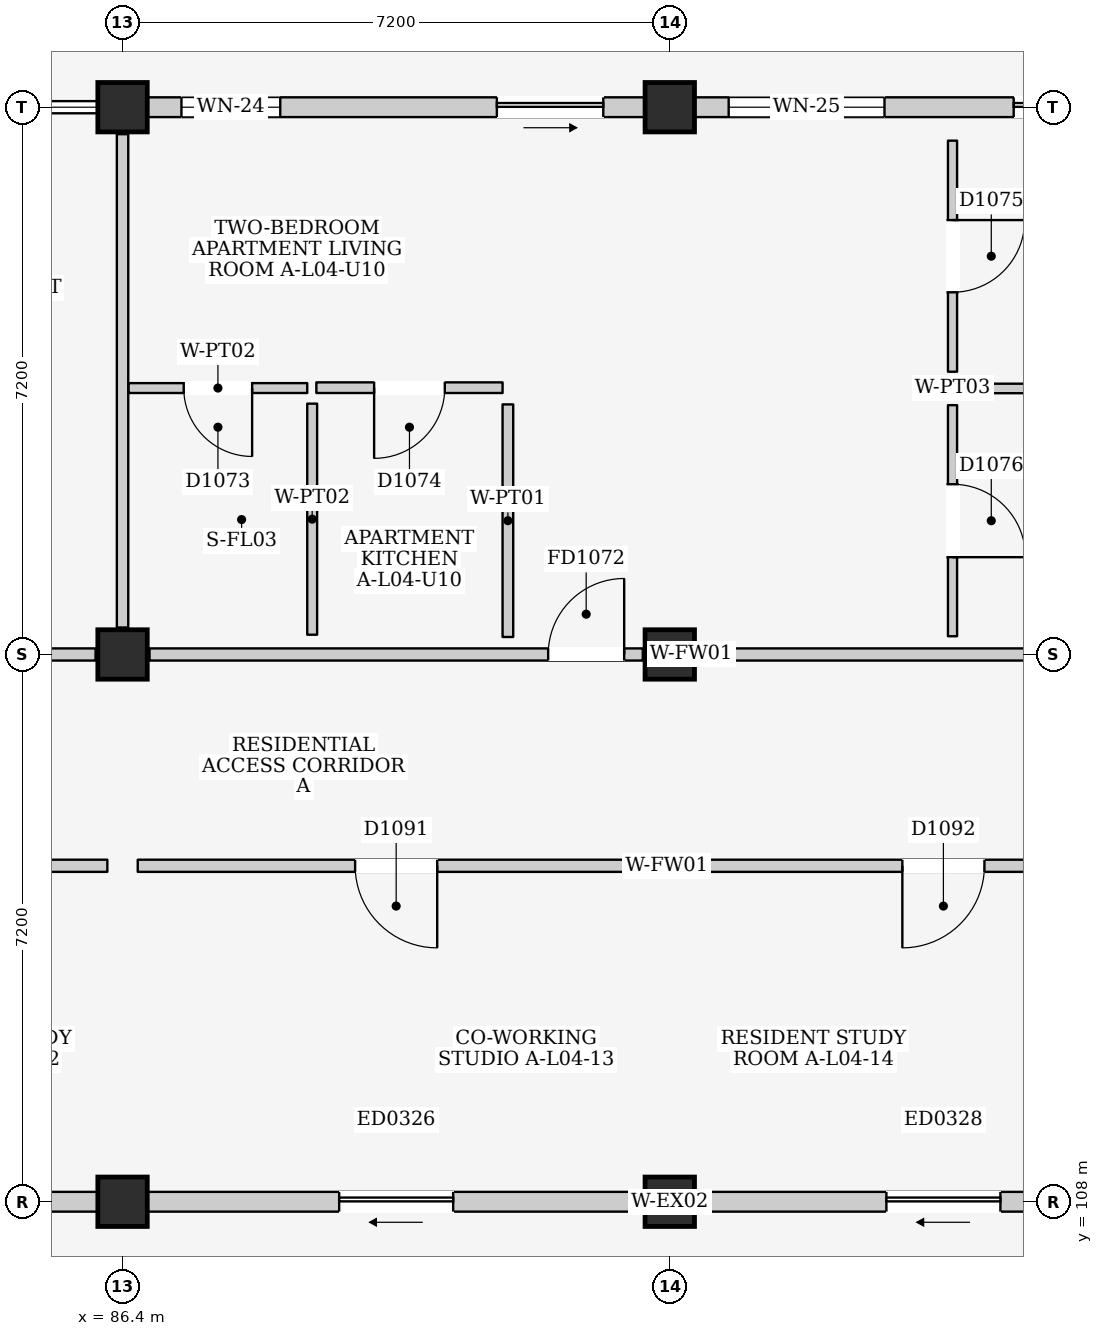
"""IFC4 building model, lengths in metres.
Left out: names, types, materials, properties, quantities, classifications, styles, units other than length and angle.
Written with IfcOpenShell. Run it as: python <this file> out.ifc"""

import sys

from ifc_helpers import new_model, si_unit, direction, frame, frame_2d, origin, origin_2d, place, context, subcontext, project, spatial, rectangle, extrude, element, fill, save


model = new_model("IFC4")
c1 = context("Model", 3, precision=1e-05, world=origin(), true_north=direction((0.0, 1.0)))
c2 = subcontext(c1, "Body", "Model", "MODEL_VIEW")
j1 = project(units=[si_unit("LENGTHUNIT", "METRE"), si_unit("PLANEANGLEUNIT", "RADIAN")], contexts=[c1])
p1 = place(None, origin())
s1 = spatial("IfcSite", under=j1, at=p1, CompositionType="ELEMENT")
p2 = place(p1, origin())
s2 = spatial("IfcBuilding", under=s1, at=p2, CompositionType="ELEMENT")
p3 = place(p2, frame((0.0, 0.0, 15.4)))
s3 = spatial("IfcBuildingStorey", under=s2, at=p3, CompositionType="ELEMENT", Elevation=15.4)
for number, where, z_axis, x_axis in (
    (1, (86.4, 108.0, 0.0), (0.0, 0.0, 1.0), (1.0, 0.0, 0.0)),
    (2, (86.4, 115.2, 0.0), (0.0, 0.0, 1.0), (1.0, 0.0, 0.0)),
    (3, (86.4, 122.4, 0.0), (0.0, 0.0, 1.0), (1.0, 0.0, 0.0)),
    (4, (93.6, 108.0, 0.0), (0.0, 0.0, 1.0), (1.0, 0.0, 0.0)),
    (5, (93.6, 115.2, 0.0), (0.0, 0.0, 1.0), (1.0, 0.0, 0.0)),
    (6, (93.6, 122.4, 0.0), (0.0, 0.0, 1.0), (1.0, 0.0, 0.0)),
):
    element("IfcColumn", number, at=place(p3, frame(where, z_axis=z_axis, x_axis=x_axis)), inside=s3, PredefinedType="COLUMN", context=c2, shape_type="SweptSolid", body=[
        extrude(rectangle(XDim=0.65, YDim=0.65, at=origin_2d()), origin(), (0.0, 0.0, 1.0), 3.2),
    ])
p4 = place(p3, frame((79.525, 108.0, 0.0), z_axis=(0.0, 0.0, 1.0), x_axis=(1.0, 0.0, 0.0)))
e7 = element("IfcWall", 7, at=p4, inside=s3, PredefinedType="ELEMENTEDWALL", context=c2, shape_type="SweptSolid", body=[
    extrude(rectangle(XDim=6.55, YDim=0.26, at=frame_2d((3.275, 0.0))), origin(), (0.0, 0.0, 1.0), 2.285),
])
p5 = place(p4, frame((2.525, 0.0, 0.0)))
e8 = element("IfcOpeningElement", 8, at=p5, cuts=e7, PredefinedType="OPENING", context=c2, shape_type="SweptSolid", body=[
    extrude(rectangle(XDim=1.5, YDim=2.12, at=frame_2d((0.75, 1.06))), frame((0.0, 0.145, 0.0), z_axis=(0.0, -1.0, 0.0), x_axis=(1.0, 0.0, 0.0)), (0.0, 0.0, 1.0), 0.29),
])
p6 = place(p3, frame((86.725, 122.4, 0.0), z_axis=(0.0, 0.0, 1.0), x_axis=(1.0, 0.0, 0.0)))
e9 = element("IfcWall", 9, at=p6, inside=s3, PredefinedType="ELEMENTEDWALL", context=c2, shape_type="SweptSolid", body=[
    extrude(rectangle(XDim=6.55, YDim=0.26, at=frame_2d((3.275, 0.0))), origin(), (0.0, 0.0, 1.0), 2.43),
])
p7 = place(p6, frame((4.6, 0.0, 0.0)))
e10 = element("IfcOpeningElement", 10, at=p7, cuts=e9, PredefinedType="OPENING", context=c2, shape_type="SweptSolid", body=[
    extrude(rectangle(XDim=1.4, YDim=2.1, at=frame_2d((0.7, 1.05))), frame((0.0, 0.145, 0.0), z_axis=(0.0, -1.0, 0.0), x_axis=(1.0, 0.0, 0.0)), (0.0, 0.0, 1.0), 0.29),
])
p8 = place(p6, frame((0.45, 0.0, 0.9)))
e11 = element("IfcOpeningElement", 11, at=p8, cuts=e9, PredefinedType="OPENING", context=c2, shape_type="SweptSolid", body=[
    extrude(rectangle(XDim=1.3, YDim=1.25, at=frame_2d((0.65, 0.625))), frame((0.0, 0.145, 0.0), z_axis=(0.0, -1.0, 0.0), x_axis=(1.0, 0.0, 0.0)), (0.0, 0.0, 1.0), 0.29),
])
p9 = place(p3, frame((86.725, 108.0, 0.0), z_axis=(0.0, 0.0, 1.0), x_axis=(1.0, 0.0, 0.0)))
e12 = element("IfcWall", 12, at=p9, inside=s3, PredefinedType="ELEMENTEDWALL", context=c2, shape_type="SweptSolid", body=[
    extrude(rectangle(XDim=6.55, YDim=0.26, at=frame_2d((3.275, 0.0))), origin(), (0.0, 0.0, 1.0), 2.285),
])
p10 = place(p9, frame((2.525, 0.0, 0.0)))
e13 = element("IfcOpeningElement", 13, at=p10, cuts=e12, PredefinedType="OPENING", context=c2, shape_type="SweptSolid", body=[
    extrude(rectangle(XDim=1.5, YDim=2.12, at=frame_2d((0.75, 1.06))), frame((0.0, 0.145, 0.0), z_axis=(0.0, -1.0, 0.0), x_axis=(1.0, 0.0, 0.0)), (0.0, 0.0, 1.0), 0.29),
])
p11 = place(p3, frame((93.925, 122.4, 0.0), z_axis=(0.0, 0.0, 1.0), x_axis=(1.0, 0.0, 0.0)))
e14 = element("IfcWall", 14, at=p11, inside=s3, PredefinedType="ELEMENTEDWALL", context=c2, shape_type="SweptSolid", body=[
    extrude(rectangle(XDim=6.55, YDim=0.26, at=frame_2d((3.275, 0.0))), origin(), (0.0, 0.0, 1.0), 2.43),
])
p12 = place(p11, frame((4.2, 0.0, 0.0)))
e15 = element("IfcOpeningElement", 15, at=p12, cuts=e14, PredefinedType="OPENING", context=c2, shape_type="SweptSolid", body=[
    extrude(rectangle(XDim=1.8, YDim=2.12, at=frame_2d((0.9, 1.06))), frame((0.0, 0.145, 0.0), z_axis=(0.0, -1.0, 0.0), x_axis=(1.0, 0.0, 0.0)), (0.0, 0.0, 1.0), 0.29),
])
p13 = place(p11, frame((0.45, 0.0, 0.71)))
e16 = element("IfcOpeningElement", 16, at=p13, cuts=e14, PredefinedType="OPENING", context=c2, shape_type="SweptSolid", body=[
    extrude(rectangle(XDim=2.05, YDim=1.6, at=frame_2d((1.025, 0.8))), frame((0.0, 0.145, 0.0), z_axis=(0.0, -1.0, 0.0), x_axis=(1.0, 0.0, 0.0)), (0.0, 0.0, 1.0), 0.29),
])
p14 = place(p3, frame((93.925, 108.0, 0.0), z_axis=(0.0, 0.0, 1.0), x_axis=(1.0, 0.0, 0.0)))
e17 = element("IfcWall", 17, at=p14, inside=s3, PredefinedType="ELEMENTEDWALL", context=c2, shape_type="SweptSolid", body=[
    extrude(rectangle(XDim=6.55, YDim=0.26, at=frame_2d((3.275, 0.0))), origin(), (0.0, 0.0, 1.0), 2.285),
])
p15 = place(p14, frame((2.525, 0.0, 0.0)))
e18 = element("IfcOpeningElement", 18, at=p15, cuts=e17, PredefinedType="OPENING", context=c2, shape_type="SweptSolid", body=[
    extrude(rectangle(XDim=1.5, YDim=2.12, at=frame_2d((0.75, 1.06))), frame((0.0, 0.145, 0.0), z_axis=(0.0, -1.0, 0.0), x_axis=(1.0, 0.0, 0.0)), (0.0, 0.0, 1.0), 0.29),
])
p16 = place(p3, frame((79.555, 115.2, 0.0), z_axis=(0.0, 0.0, 1.0), x_axis=(1.0, 0.0, 0.0)))
e19 = element("IfcWall", 19, at=p16, inside=s3, PredefinedType="PARTITIONING", context=c2, shape_type="SweptSolid", body=[
    extrude(rectangle(XDim=6.49, YDim=0.16, at=frame_2d((3.245, 0.0))), origin(), (0.0, 0.0, 1.0), 2.285),
])
p17 = place(p16, frame((2.745, 0.0, 0.0)))
e20 = element("IfcOpeningElement", 20, at=p17, cuts=e19, PredefinedType="OPENING", context=c2, shape_type="SweptSolid", body=[
    extrude(rectangle(XDim=1.0, YDim=2.15, at=frame_2d((0.5, 1.075))), frame((0.0, 0.095, 0.0), z_axis=(0.0, -1.0, 0.0), x_axis=(1.0, 0.0, 0.0)), (0.0, 0.0, 1.0), 0.19),
])
p18 = place(p3, frame((86.4, 115.555, 0.0), z_axis=(0.0, 0.0, 1.0), x_axis=(0.0, 1.0, 0.0)))
e21 = element("IfcWall", 21, at=p18, inside=s3, PredefinedType="PARTITIONING", context=c2, shape_type="SweptSolid", body=[
    extrude(rectangle(XDim=6.49, YDim=0.15, at=frame_2d((3.245, 0.0))), origin(), (0.0, 0.0, 1.0), 2.385),
])
p19 = place(p3, frame((86.755, 115.2, 0.0), z_axis=(0.0, 0.0, 1.0), x_axis=(1.0, 0.0, 0.0)))
e22 = element("IfcWall", 22, at=p19, inside=s3, PredefinedType="PARTITIONING", context=c2, shape_type="SweptSolid", body=[
    extrude(rectangle(XDim=6.49, YDim=0.16, at=frame_2d((3.245, 0.0))), origin(), (0.0, 0.0, 1.0), 2.285),
])
p20 = place(p19, frame((5.245, 0.0, 0.0)))
e23 = element("IfcOpeningElement", 23, at=p20, cuts=e22, PredefinedType="OPENING", context=c2, shape_type="SweptSolid", body=[
    extrude(rectangle(XDim=1.0, YDim=2.15, at=frame_2d((0.5, 1.075))), frame((0.0, 0.095, 0.0), z_axis=(0.0, -1.0, 0.0), x_axis=(1.0, 0.0, 0.0)), (0.0, 0.0, 1.0), 0.19),
])
p21 = place(p3, frame((93.955, 115.2, 0.0), z_axis=(0.0, 0.0, 1.0), x_axis=(1.0, 0.0, 0.0)))
e24 = element("IfcWall", 24, at=p21, inside=s3, PredefinedType="PARTITIONING", context=c2, shape_type="SweptSolid", body=[
    extrude(rectangle(XDim=6.49, YDim=0.16, at=frame_2d((3.245, 0.0))), origin(), (0.0, 0.0, 1.0), 2.285),
])
p22 = place(p3, frame((86.48, 118.705, 0.0), z_axis=(0.0, 0.0, 1.0), x_axis=(1.0, 0.0, 0.0)))
e25 = element("IfcWall", 25, at=p22, inside=s3, PredefinedType="PARTITIONING", context=c2, shape_type="SweptSolid", body=[
    extrude(rectangle(XDim=2.35, YDim=0.13, at=frame_2d((1.175, 0.0))), origin(), (0.0, 0.0, 1.0), 2.95),
])
p23 = place(p22, frame((0.725, 0.0, 0.0)))
e26 = element("IfcOpeningElement", 26, at=p23, cuts=e25, PredefinedType="OPENING", context=c2, shape_type="SweptSolid", body=[
    extrude(rectangle(XDim=0.9, YDim=2.1, at=frame_2d((0.45, 1.05))), frame((0.0, 0.08, 0.0), z_axis=(0.0, -1.0, 0.0), x_axis=(1.0, 0.0, 0.0)), (0.0, 0.0, 1.0), 0.16),
])
p24 = place(p3, frame((88.895, 115.46, 0.0), z_axis=(0.0, 0.0, 1.0), x_axis=(0.0, 1.0, 0.0)))
e27 = element("IfcWall", 27, at=p24, inside=s3, PredefinedType="PARTITIONING", context=c2, shape_type="SweptSolid", body=[
    extrude(rectangle(XDim=3.04, YDim=0.13, at=frame_2d((1.52, 0.0))), origin(), (0.0, 0.0, 1.0), 2.95),
])
p25 = place(p3, frame((88.95, 118.71, 0.0), z_axis=(0.0, 0.0, 1.0), x_axis=(1.0, 0.0, 0.0)))
e28 = element("IfcWall", 28, at=p25, inside=s3, PredefinedType="PARTITIONING", context=c2, shape_type="SweptSolid", body=[
    extrude(rectangle(XDim=2.45, YDim=0.14, at=frame_2d((1.225, 0.0))), origin(), (0.0, 0.0, 1.0), 2.95),
])
p26 = place(p25, frame((0.76, 0.0, 0.0)))
e29 = element("IfcOpeningElement", 29, at=p26, cuts=e28, PredefinedType="OPENING", context=c2, shape_type="SweptSolid", body=[
    extrude(rectangle(XDim=0.93, YDim=2.14, at=frame_2d((0.465, 1.07))), frame((0.0, 0.085, 0.0), z_axis=(0.0, -1.0, 0.0), x_axis=(1.0, 0.0, 0.0)), (0.0, 0.0, 1.0), 0.17),
])
p27 = place(p3, frame((91.47, 115.43, 0.0), z_axis=(0.0, 0.0, 1.0), x_axis=(0.0, 1.0, 0.0)))
e30 = element("IfcWall", 30, at=p27, inside=s3, PredefinedType="PARTITIONING", context=c2, shape_type="SweptSolid", body=[
    extrude(rectangle(XDim=3.06, YDim=0.14, at=frame_2d((1.53, 0.0))), origin(), (0.0, 0.0, 1.0), 2.95),
])
p28 = place(p3, frame((97.32, 118.92, 0.0), z_axis=(0.0, 0.0, 1.0), x_axis=(0.0, 1.0, 0.0)))
e31 = element("IfcWall", 31, at=p28, inside=s3, PredefinedType="PARTITIONING", context=c2, shape_type="SweptSolid", body=[
    extrude(rectangle(XDim=3.04, YDim=0.12, at=frame_2d((1.52, 0.0))), origin(), (0.0, 0.0, 1.0), 2.95),
])
p29 = place(p28, frame((1.045, 0.0, 0.0)))
e32 = element("IfcOpeningElement", 32, at=p29, cuts=e31, PredefinedType="OPENING", context=c2, shape_type="SweptSolid", body=[
    extrude(rectangle(XDim=0.95, YDim=2.15, at=frame_2d((0.475, 1.075))), frame((0.0, 0.075, 0.0), z_axis=(0.0, -1.0, 0.0), x_axis=(1.0, 0.0, 0.0)), (0.0, 0.0, 1.0), 0.15),
])
p30 = place(p3, frame((97.52, 118.7, 0.0), z_axis=(0.0, 0.0, 1.0), x_axis=(1.0, 0.0, 0.0)))
e33 = element("IfcWall", 33, at=p30, inside=s3, PredefinedType="PARTITIONING", context=c2, shape_type="SweptSolid", body=[
    extrude(rectangle(XDim=3.06, YDim=0.125, at=frame_2d((1.53, 0.0))), origin(), (0.0, 0.0, 1.0), 2.95),
])
p31 = place(p3, frame((97.32, 115.44, 0.0), z_axis=(0.0, 0.0, 1.0), x_axis=(0.0, 1.0, 0.0)))
e34 = element("IfcWall", 34, at=p31, inside=s3, PredefinedType="PARTITIONING", context=c2, shape_type="SweptSolid", body=[
    extrude(rectangle(XDim=3.04, YDim=0.12, at=frame_2d((1.52, 0.0))), origin(), (0.0, 0.0, 1.0), 2.95),
])
p32 = place(p31, frame((1.04, 0.0, 0.0)))
e35 = element("IfcOpeningElement", 35, at=p32, cuts=e34, PredefinedType="OPENING", context=c2, shape_type="SweptSolid", body=[
    extrude(rectangle(XDim=0.96, YDim=2.15, at=frame_2d((0.48, 1.075))), frame((0.0, 0.075, 0.0), z_axis=(0.0, -1.0, 0.0), x_axis=(1.0, 0.0, 0.0)), (0.0, 0.0, 1.0), 0.15),
])
p33 = place(p3, frame((79.4, 112.42, 0.0), z_axis=(0.0, 0.0, 1.0), x_axis=(1.0, 0.0, 0.0)))
e36 = element("IfcWall", 36, at=p33, inside=s3, PredefinedType="PARTITIONING", context=c2, shape_type="SweptSolid", body=[
    extrude(rectangle(XDim=6.8, YDim=0.16, at=frame_2d((3.4, 0.0))), origin(), (0.0, 0.0, 1.0), 2.95),
])
p34 = place(p33, frame((2.86, 0.0, 0.0)))
e37 = element("IfcOpeningElement", 37, at=p34, cuts=e36, PredefinedType="OPENING", context=c2, shape_type="SweptSolid", body=[
    extrude(rectangle(XDim=1.08, YDim=2.22, at=frame_2d((0.54, 1.11))), frame((0.0, 0.095, 0.0), z_axis=(0.0, -1.0, 0.0), x_axis=(1.0, 0.0, 0.0)), (0.0, 0.0, 1.0), 0.19),
])
p35 = place(p3, frame((86.6, 112.42, 0.0), z_axis=(0.0, 0.0, 1.0), x_axis=(1.0, 0.0, 0.0)))
e38 = element("IfcWall", 38, at=p35, inside=s3, PredefinedType="PARTITIONING", context=c2, shape_type="SweptSolid", body=[
    extrude(rectangle(XDim=6.8, YDim=0.16, at=frame_2d((3.4, 0.0))), origin(), (0.0, 0.0, 1.0), 2.95),
])
p36 = place(p35, frame((2.86, 0.0, 0.0)))
e39 = element("IfcOpeningElement", 39, at=p36, cuts=e38, PredefinedType="OPENING", context=c2, shape_type="SweptSolid", body=[
    extrude(rectangle(XDim=1.08, YDim=2.22, at=frame_2d((0.54, 1.11))), frame((0.0, 0.095, 0.0), z_axis=(0.0, -1.0, 0.0), x_axis=(1.0, 0.0, 0.0)), (0.0, 0.0, 1.0), 0.19),
])
p37 = place(p3, frame((93.8, 112.42, 0.0), z_axis=(0.0, 0.0, 1.0), x_axis=(1.0, 0.0, 0.0)))
e40 = element("IfcWall", 40, at=p37, inside=s3, PredefinedType="PARTITIONING", context=c2, shape_type="SweptSolid", body=[
    extrude(rectangle(XDim=6.8, YDim=0.16, at=frame_2d((3.4, 0.0))), origin(), (0.0, 0.0, 1.0), 2.95),
])
p38 = place(p37, frame((2.86, 0.0, 0.0)))
e41 = element("IfcOpeningElement", 41, at=p38, cuts=e40, PredefinedType="OPENING", context=c2, shape_type="SweptSolid", body=[
    extrude(rectangle(XDim=1.08, YDim=2.22, at=frame_2d((0.54, 1.11))), frame((0.0, 0.095, 0.0), z_axis=(0.0, -1.0, 0.0), x_axis=(1.0, 0.0, 0.0)), (0.0, 0.0, 1.0), 0.19),
])
p39 = place(p7, frame((1.4, 0.0, 0.0), z_axis=(0.0, 0.0, 1.0), x_axis=(-1.0, 0.0, 0.0)))
e42 = element("IfcDoor", 42, at=p39, inside=s3, OperationType="SLIDING_TO_RIGHT", PredefinedType="DOOR", context=c2, shape_type="SweptSolid", body=[
    extrude(rectangle(XDim=1.4, YDim=2.1, at=frame_2d((0.7, 1.05))), frame((0.0, 0.025, 0.0), z_axis=(0.0, -1.0, 0.0), x_axis=(1.0, 0.0, 0.0)), (0.0, 0.0, 1.0), 0.05),
])
fill(e10, e42)
p40 = place(p8, origin())
e43 = element("IfcWindow", 43, at=p40, inside=s3, PartitioningType="SINGLE_PANEL", PredefinedType="WINDOW", context=c2, shape_type="SweptSolid", body=[
    extrude(rectangle(XDim=1.3, YDim=1.25, at=frame_2d((0.65, 0.625))), frame((0.0, 0.03, 0.0), z_axis=(0.0, -1.0, 0.0), x_axis=(1.0, 0.0, 0.0)), (0.0, 0.0, 1.0), 0.06),
])
fill(e11, e43)
p41 = place(p10, frame((1.5, 0.0, 0.0), z_axis=(0.0, 0.0, 1.0), x_axis=(-1.0, 0.0, 0.0)))
e44 = element("IfcDoor", 44, at=p41, inside=s3, OperationType="SLIDING_TO_LEFT", PredefinedType="DOOR", context=c2, shape_type="SweptSolid", body=[
    extrude(rectangle(XDim=1.5, YDim=2.12, at=frame_2d((0.75, 1.06))), frame((0.0, 0.025, 0.0), z_axis=(0.0, -1.0, 0.0), x_axis=(1.0, 0.0, 0.0)), (0.0, 0.0, 1.0), 0.05),
])
fill(e13, e44)
p42 = place(p12, frame((1.8, 0.0, 0.0), z_axis=(0.0, 0.0, 1.0), x_axis=(-1.0, 0.0, 0.0)))
e45 = element("IfcDoor", 45, at=p42, inside=s3, OperationType="SLIDING_TO_LEFT", PredefinedType="DOOR", context=c2, shape_type="SweptSolid", body=[
    extrude(rectangle(XDim=1.8, YDim=2.12, at=frame_2d((0.9, 1.06))), frame((0.0, 0.025, 0.0), z_axis=(0.0, -1.0, 0.0), x_axis=(1.0, 0.0, 0.0)), (0.0, 0.0, 1.0), 0.05),
])
fill(e15, e45)
p43 = place(p13, origin())
e46 = element("IfcWindow", 46, at=p43, inside=s3, PartitioningType="DOUBLE_PANEL_VERTICAL", PredefinedType="WINDOW", context=c2, shape_type="SweptSolid", body=[
    extrude(rectangle(XDim=2.05, YDim=1.6, at=frame_2d((1.025, 0.8))), frame((0.0, 0.03, 0.0), z_axis=(0.0, -1.0, 0.0), x_axis=(1.0, 0.0, 0.0)), (0.0, 0.0, 1.0), 0.06),
])
fill(e16, e46)
p44 = place(p15, frame((1.5, 0.0, 0.0), z_axis=(0.0, 0.0, 1.0), x_axis=(-1.0, 0.0, 0.0)))
e47 = element("IfcDoor", 47, at=p44, inside=s3, OperationType="SLIDING_TO_LEFT", PredefinedType="DOOR", context=c2, shape_type="SweptSolid", body=[
    extrude(rectangle(XDim=1.5, YDim=2.12, at=frame_2d((0.75, 1.06))), frame((0.0, 0.025, 0.0), z_axis=(0.0, -1.0, 0.0), x_axis=(1.0, 0.0, 0.0)), (0.0, 0.0, 1.0), 0.05),
])
fill(e18, e47)
p45 = place(p20, origin())
e48 = element("IfcDoor", 48, at=p45, inside=s3, OperationType="SINGLE_SWING_RIGHT", PredefinedType="DOOR", context=c2, shape_type="SweptSolid", body=[
    extrude(rectangle(XDim=1.0, YDim=2.15, at=frame_2d((0.5, 1.075))), frame((0.0, 0.025, 0.0), z_axis=(0.0, -1.0, 0.0), x_axis=(1.0, 0.0, 0.0)), (0.0, 0.0, 1.0), 0.05),
])
fill(e23, e48)
p46 = place(p23, frame((0.9, 0.0, 0.0), z_axis=(0.0, 0.0, 1.0), x_axis=(-1.0, 0.0, 0.0)))
e49 = element("IfcDoor", 49, at=p46, inside=s3, OperationType="SINGLE_SWING_LEFT", PredefinedType="DOOR", context=c2, shape_type="SweptSolid", body=[
    extrude(rectangle(XDim=0.9, YDim=2.1, at=frame_2d((0.45, 1.05))), frame((0.0, 0.025, 0.0), z_axis=(0.0, -1.0, 0.0), x_axis=(1.0, 0.0, 0.0)), (0.0, 0.0, 1.0), 0.05),
])
fill(e26, e49)
p47 = place(p26, frame((0.93, 0.0, 0.0), z_axis=(0.0, 0.0, 1.0), x_axis=(-1.0, 0.0, 0.0)))
e50 = element("IfcDoor", 50, at=p47, inside=s3, OperationType="SINGLE_SWING_RIGHT", PredefinedType="DOOR", context=c2, shape_type="SweptSolid", body=[
    extrude(rectangle(XDim=0.93, YDim=2.14, at=frame_2d((0.465, 1.07))), frame((0.0, 0.025, 0.0), z_axis=(0.0, -1.0, 0.0), x_axis=(1.0, 0.0, 0.0)), (0.0, 0.0, 1.0), 0.05),
])
fill(e29, e50)
p48 = place(p29, frame((0.95, 0.0, 0.0), z_axis=(0.0, 0.0, 1.0), x_axis=(-1.0, 0.0, 0.0)))
e51 = element("IfcDoor", 51, at=p48, inside=s3, OperationType="SINGLE_SWING_LEFT", PredefinedType="DOOR", context=c2, shape_type="SweptSolid", body=[
    extrude(rectangle(XDim=0.95, YDim=2.15, at=frame_2d((0.475, 1.075))), frame((0.0, 0.025, 0.0), z_axis=(0.0, -1.0, 0.0), x_axis=(1.0, 0.0, 0.0)), (0.0, 0.0, 1.0), 0.05),
])
fill(e32, e51)
p49 = place(p32, frame((0.96, 0.0, 0.0), z_axis=(0.0, 0.0, 1.0), x_axis=(-1.0, 0.0, 0.0)))
e52 = element("IfcDoor", 52, at=p49, inside=s3, OperationType="SINGLE_SWING_RIGHT", PredefinedType="DOOR", context=c2, shape_type="SweptSolid", body=[
    extrude(rectangle(XDim=0.96, YDim=2.15, at=frame_2d((0.48, 1.075))), frame((0.0, 0.025, 0.0), z_axis=(0.0, -1.0, 0.0), x_axis=(1.0, 0.0, 0.0)), (0.0, 0.0, 1.0), 0.05),
])
fill(e35, e52)
p50 = place(p36, frame((1.08, 0.0, 0.0), z_axis=(0.0, 0.0, 1.0), x_axis=(-1.0, 0.0, 0.0)))
e53 = element("IfcDoor", 53, at=p50, inside=s3, OperationType="SINGLE_SWING_LEFT", PredefinedType="DOOR", context=c2, shape_type="SweptSolid", body=[
    extrude(rectangle(XDim=1.08, YDim=2.22, at=frame_2d((0.54, 1.11))), frame((0.0, 0.025, 0.0), z_axis=(0.0, -1.0, 0.0), x_axis=(1.0, 0.0, 0.0)), (0.0, 0.0, 1.0), 0.05),
])
fill(e39, e53)
p51 = place(p38, frame((1.08, 0.0, 0.0), z_axis=(0.0, 0.0, 1.0), x_axis=(-1.0, 0.0, 0.0)))
e54 = element("IfcDoor", 54, at=p51, inside=s3, OperationType="SINGLE_SWING_RIGHT", PredefinedType="DOOR", context=c2, shape_type="SweptSolid", body=[
    extrude(rectangle(XDim=1.08, YDim=2.22, at=frame_2d((0.54, 1.11))), frame((0.0, 0.025, 0.0), z_axis=(0.0, -1.0, 0.0), x_axis=(1.0, 0.0, 0.0)), (0.0, 0.0, 1.0), 0.05),
])
fill(e41, e54)
save(model, sys.argv[1])
